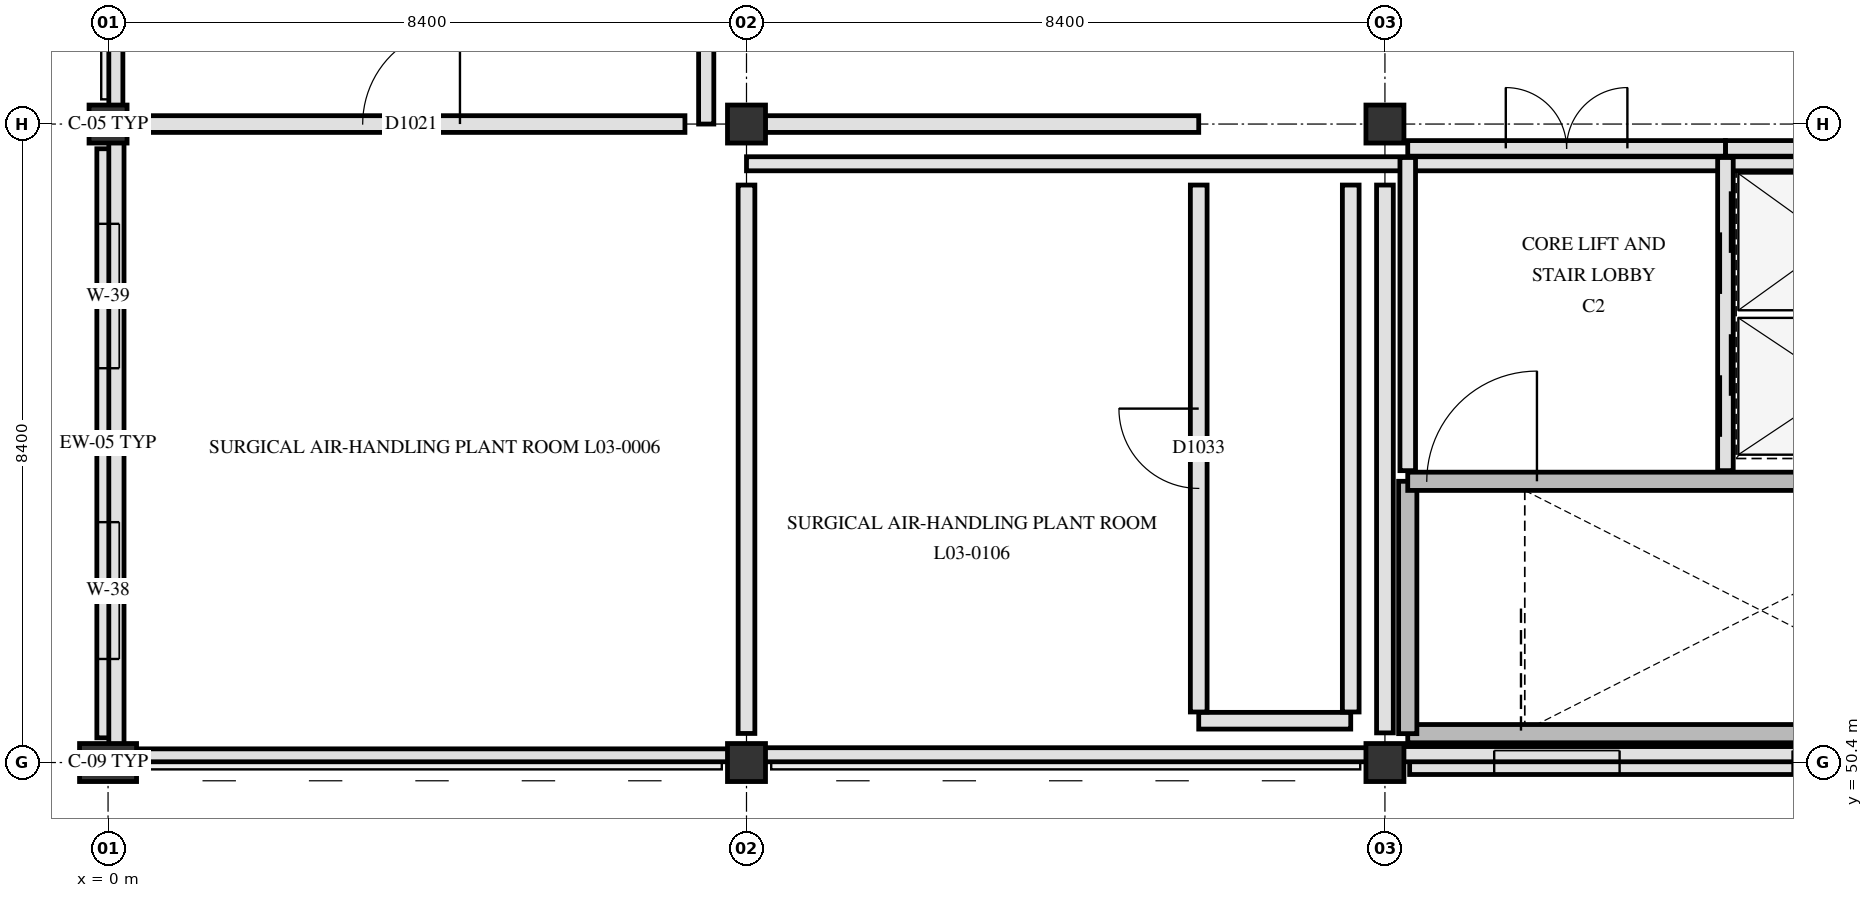
"""IFC4 building model, lengths in metres.
Left out: names, types, materials, properties, quantities, classifications, styles, units other than length and angle.
Written with IfcOpenShell. Run it as: python <this file> out.ifc"""

import sys

from ifc_helpers import new_model, si_unit, direction, frame, frame_2d, origin, origin_2d, place, context, subcontext, project, spatial, rectangle, extrude, element, fill, save


model = new_model("IFC4")
c1 = context("Model", 3, precision=1e-05, world=origin(), true_north=direction((0.0, 1.0)))
c2 = subcontext(c1, "Body", "Model", "MODEL_VIEW")
j1 = project(units=[si_unit("LENGTHUNIT", "METRE"), si_unit("PLANEANGLEUNIT", "RADIAN")], contexts=[c1])
p1 = place(None, origin())
s1 = spatial("IfcSite", under=j1, at=p1, CompositionType="ELEMENT")
p2 = place(p1, origin())
s2 = spatial("IfcBuilding", under=s1, at=p2, CompositionType="ELEMENT")
p3 = place(p2, frame((0.0, 0.0, 14.4)))
s3 = spatial("IfcBuildingStorey", under=s2, at=p3, CompositionType="ELEMENT", Elevation=14.4)
p4 = place(p3, frame((0.0, 50.4, 0.0), z_axis=(0.0, 0.0, 1.0), x_axis=(0.0, 1.0, 0.0)))
e1 = element("IfcColumn", 1, at=p4, inside=s3, PredefinedType="PILASTER", context=c2, shape_type="SweptSolid", body=[
    extrude(rectangle(XDim=0.5, YDim=0.75, at=origin_2d()), origin(), (0.0, 0.0, 1.0), 4.2),
])
for number, where, z_axis, x_axis in (
    (2, (0.0, 58.8, 0.0), (0.0, 0.0, 1.0), (1.0, 0.0, 0.0)),
    (3, (8.4, 50.4, 0.0), (0.0, 0.0, 1.0), (1.0, 0.0, 0.0)),
    (4, (8.4, 58.8, 0.0), (0.0, 0.0, 1.0), (1.0, 0.0, 0.0)),
    (5, (16.8, 50.4, 0.0), (0.0, 0.0, 1.0), (1.0, 0.0, 0.0)),
    (6, (16.8, 58.8, 0.0), (0.0, 0.0, 1.0), (1.0, 0.0, 0.0)),
):
    element("IfcColumn", number, at=place(p3, frame(where, z_axis=z_axis, x_axis=x_axis)), inside=s3, PredefinedType="COLUMN", context=c2, shape_type="SweptSolid", body=[
        extrude(rectangle(XDim=0.5, YDim=0.5, at=origin_2d()), origin(), (0.0, 0.0, 1.0), 4.2),
    ])
p5 = place(p3, frame((0.0, 50.725, 0.0), z_axis=(0.0, 0.0, 1.0), x_axis=(0.0, 1.0, 0.0)))
e7 = element("IfcWall", 7, at=p5, inside=s3, PredefinedType="SOLIDWALL", context=c2, shape_type="SweptSolid", body=[
    extrude(rectangle(XDim=7.75, YDim=0.295, at=frame_2d((3.875, 0.0))), origin(), (0.0, 0.0, 1.0), 3.19),
])
p6 = place(p5, frame((1.038, 0.0, 0.85)))
e8 = element("IfcOpeningElement", 8, at=p6, cuts=e7, PredefinedType="OPENING", context=c2, shape_type="SweptSolid", body=[
    extrude(rectangle(XDim=1.8, YDim=1.66, at=frame_2d((0.9, 0.83))), frame((0.0, 0.157, 0.0), z_axis=(0.0, -1.0, 0.0), x_axis=(1.0, 0.0, 0.0)), (0.0, 0.0, 1.0), 0.315),
])
p7 = place(p5, frame((4.863, 0.0, 0.85)))
e9 = element("IfcOpeningElement", 9, at=p7, cuts=e7, PredefinedType="OPENING", context=c2, shape_type="SweptSolid", body=[
    extrude(rectangle(XDim=1.9, YDim=1.66, at=frame_2d((0.95, 0.83))), frame((0.0, 0.157, 0.0), z_axis=(0.0, -1.0, 0.0), x_axis=(1.0, 0.0, 0.0)), (0.0, 0.0, 1.0), 0.315),
])
p8 = place(p3, frame((24.875, 50.4, 0.0), z_axis=(0.0, 0.0, 1.0), x_axis=(-1.0, 0.0, 0.0)))
e10 = element("IfcWall", 10, at=p8, inside=s3, PredefinedType="SOLIDWALL", context=c2, shape_type="SweptSolid", body=[
    extrude(rectangle(XDim=7.75, YDim=0.315, at=frame_2d((3.875, 0.0))), origin(), (0.0, 0.0, 1.0), 3.19),
])
p9 = place(p8, frame((1.163, 0.0, 0.85)))
e11 = element("IfcOpeningElement", 11, at=p9, cuts=e10, PredefinedType="OPENING", context=c2, shape_type="SweptSolid", body=[
    extrude(rectangle(XDim=1.55, YDim=1.54, at=frame_2d((0.775, 0.77))), frame((0.0, 0.167, 0.0), z_axis=(0.0, -1.0, 0.0), x_axis=(1.0, 0.0, 0.0)), (0.0, 0.0, 1.0), 0.335),
])
p10 = place(p8, frame((4.988, 0.0, 0.85)))
e12 = element("IfcOpeningElement", 12, at=p10, cuts=e10, PredefinedType="OPENING", context=c2, shape_type="SweptSolid", body=[
    extrude(rectangle(XDim=1.65, YDim=1.54, at=frame_2d((0.825, 0.77))), frame((0.0, 0.167, 0.0), z_axis=(0.0, -1.0, 0.0), x_axis=(1.0, 0.0, 0.0)), (0.0, 0.0, 1.0), 0.335),
])
p11 = place(p3, frame((7.87, 109.2, 4.18), z_axis=(0.0, 0.0, 1.0), x_axis=(0.0, -1.0, 0.0)))
e13 = element("IfcWall", 13, at=p11, inside=s3, PredefinedType="PARAPET", context=c2, shape_type="SweptSolid", body=[
    extrude(rectangle(XDim=50.4, YDim=0.2, at=frame_2d((25.2, 0.0))), origin(), (0.0, 0.0, 1.0), 1.17),
])
p12 = place(p3, frame((8.4, 58.278, 4.18), z_axis=(0.0, 0.0, 1.0), x_axis=(1.0, 0.0, 0.0)))
e14 = element("IfcWall", 14, at=p12, inside=s3, PredefinedType="PARAPET", context=c2, shape_type="SweptSolid", body=[
    extrude(rectangle(XDim=42.0, YDim=0.185, at=frame_2d((21.0, 0.0))), origin(), (0.0, 0.0, 1.0), 1.17),
])
p13 = place(p3, frame((25.2, 50.51, 4.18), z_axis=(0.0, 0.0, 1.0), x_axis=(-1.0, 0.0, 0.0)))
e15 = element("IfcWall", 15, at=p13, inside=s3, PredefinedType="PARAPET", context=c2, shape_type="SweptSolid", body=[
    extrude(rectangle(XDim=8.4, YDim=0.2, at=frame_2d((4.2, 0.0))), origin(), (0.0, 0.0, 1.0), 1.17),
])
p14 = place(p3, frame((16.8, 50.502, 4.18), z_axis=(0.0, 0.0, 1.0), x_axis=(-1.0, 0.0, 0.0)))
e16 = element("IfcWall", 16, at=p14, inside=s3, PredefinedType="PARAPET", context=c2, shape_type="SweptSolid", body=[
    extrude(rectangle(XDim=8.4, YDim=0.185, at=frame_2d((4.2, 0.0))), origin(), (0.0, 0.0, 1.0), 1.17),
])
p15 = place(p3, frame((8.4, 50.495, 4.18), z_axis=(0.0, 0.0, 1.0), x_axis=(-1.0, 0.0, 0.0)))
e17 = element("IfcWall", 17, at=p15, inside=s3, PredefinedType="PARAPET", context=c2, shape_type="SweptSolid", body=[
    extrude(rectangle(XDim=8.4, YDim=0.17, at=frame_2d((4.2, 0.0))), origin(), (0.0, 0.0, 1.0), 1.17),
])
p16 = place(p3, frame((0.11, 50.4, 4.18), z_axis=(0.0, 0.0, 1.0), x_axis=(0.0, 1.0, 0.0)))
e18 = element("IfcWall", 18, at=p16, inside=s3, PredefinedType="PARAPET", context=c2, shape_type="SweptSolid", body=[
    extrude(rectangle(XDim=8.4, YDim=0.2, at=frame_2d((4.2, 0.0))), origin(), (0.0, 0.0, 1.0), 1.17),
])
p17 = place(p3, frame((0.103, 58.8, 4.18), z_axis=(0.0, 0.0, 1.0), x_axis=(0.0, 1.0, 0.0)))
e19 = element("IfcWall", 19, at=p17, inside=s3, PredefinedType="PARAPET", context=c2, shape_type="SweptSolid", body=[
    extrude(rectangle(XDim=8.4, YDim=0.185, at=frame_2d((4.2, 0.0))), origin(), (0.0, 0.0, 1.0), 1.17),
])
p18 = place(p3, frame((17.1, 50.78, 0.0), z_axis=(0.0, 0.0, 1.0), x_axis=(1.0, 0.0, 0.0)))
e20 = element("IfcWall", 20, at=p18, inside=s3, PredefinedType="SHEAR", context=c2, shape_type="SweptSolid", body=[
    extrude(rectangle(XDim=7.82, YDim=0.24, at=frame_2d((3.91, 0.0))), origin(), (0.0, 0.0, 1.0), 3.9),
])
p19 = place(p3, frame((17.1, 50.78, 0.0), z_axis=(0.0, 0.0, 1.0), x_axis=(0.0, 1.0, 0.0)))
e21 = element("IfcWall", 21, at=p19, inside=s3, PredefinedType="SHEAR", context=c2, shape_type="SweptSolid", body=[
    extrude(rectangle(XDim=3.32, YDim=0.24, at=frame_2d((1.66, 0.0))), origin(), (0.0, 0.0, 1.0), 3.9),
])
p20 = place(p3, frame((17.1, 54.1, 0.0), z_axis=(0.0, 0.0, 1.0), x_axis=(1.0, 0.0, 0.0)))
e22 = element("IfcWall", 22, at=p20, inside=s3, PredefinedType="SHEAR", context=c2, shape_type="SweptSolid", body=[
    extrude(rectangle(XDim=7.82, YDim=0.24, at=frame_2d((3.91, 0.0))), origin(), (0.0, 0.0, 1.0), 3.9),
])
p21 = place(p20, frame((0.25, 0.0, 0.0)))
e23 = element("IfcOpeningElement", 23, at=p21, cuts=e22, PredefinedType="OPENING", context=c2, shape_type="SweptSolid", body=[
    extrude(rectangle(XDim=1.45, YDim=2.2, at=frame_2d((0.725, 1.1))), frame((0.0, 0.13, 0.0), z_axis=(0.0, -1.0, 0.0), x_axis=(1.0, 0.0, 0.0)), (0.0, 0.0, 1.0), 0.26),
])
p22 = place(p3, frame((21.28, 54.24, 0.0), z_axis=(0.0, 0.0, 1.0), x_axis=(0.0, 1.0, 0.0)))
e24 = element("IfcWall", 24, at=p22, inside=s3, PredefinedType="PARTITIONING", context=c2, shape_type="SweptSolid", body=[
    extrude(rectangle(XDim=4.12, YDim=0.205, at=frame_2d((2.06, 0.0))), origin(), (0.0, 0.0, 1.0), 3.89),
])
p23 = place(p22, frame((0.445, 0.0, 0.0)))
e25 = element("IfcOpeningElement", 25, at=p23, cuts=e24, PredefinedType="OPENING", context=c2, shape_type="SweptSolid", body=[
    extrude(rectangle(XDim=1.35, YDim=2.2, at=frame_2d((0.675, 1.1))), frame((0.0, 0.113, 0.0), z_axis=(0.0, -1.0, 0.0), x_axis=(1.0, 0.0, 0.0)), (0.0, 0.0, 1.0), 0.225),
])
p24 = place(p22, frame((2.325, 0.0, 0.0)))
e26 = element("IfcOpeningElement", 26, at=p24, cuts=e24, PredefinedType="OPENING", context=c2, shape_type="SweptSolid", body=[
    extrude(rectangle(XDim=1.35, YDim=2.2, at=frame_2d((0.675, 1.1))), frame((0.0, 0.113, 0.0), z_axis=(0.0, -1.0, 0.0), x_axis=(1.0, 0.0, 0.0)), (0.0, 0.0, 1.0), 0.225),
])
p25 = place(p3, frame((21.28, 58.48, 0.0), z_axis=(0.0, 0.0, 1.0), x_axis=(1.0, 0.0, 0.0)))
e27 = element("IfcWall", 27, at=p25, inside=s3, PredefinedType="PARTITIONING", context=c2, shape_type="SweptSolid", body=[
    extrude(rectangle(XDim=3.57, YDim=0.205, at=frame_2d((1.785, 0.0))), origin(), (0.0, 0.0, 1.0), 3.28),
])
p26 = place(p3, frame((17.1, 54.24, 0.0), z_axis=(0.0, 0.0, 1.0), x_axis=(0.0, 1.0, 0.0)))
e28 = element("IfcWall", 28, at=p26, inside=s3, PredefinedType="PARTITIONING", context=c2, shape_type="SweptSolid", body=[
    extrude(rectangle(XDim=4.12, YDim=0.205, at=frame_2d((2.06, 0.0))), origin(), (0.0, 0.0, 1.0), 3.34),
])
p27 = place(p3, frame((17.1, 58.48, 0.0), z_axis=(0.0, 0.0, 1.0), x_axis=(1.0, 0.0, 0.0)))
e29 = element("IfcWall", 29, at=p27, inside=s3, PredefinedType="PARTITIONING", context=c2, shape_type="SweptSolid", body=[
    extrude(rectangle(XDim=4.18, YDim=0.205, at=frame_2d((2.09, 0.0))), origin(), (0.0, 0.0, 1.0), 3.28),
])
p28 = place(p27, frame((1.29, 0.0, 0.0)))
e30 = element("IfcOpeningElement", 30, at=p28, cuts=e29, PredefinedType="OPENING", context=c2, shape_type="SweptSolid", body=[
    extrude(rectangle(XDim=1.6, YDim=2.25, at=frame_2d((0.8, 1.125))), frame((0.0, 0.113, 0.0), z_axis=(0.0, -1.0, 0.0), x_axis=(1.0, 0.0, 0.0)), (0.0, 0.0, 1.0), 0.225),
])
p29 = place(p3, frame((14.35, 50.95, 0.0), z_axis=(0.0, 0.0, 1.0), x_axis=(1.0, 0.0, 0.0)))
e31 = element("IfcWall", 31, at=p29, inside=s3, PredefinedType="PARTITIONING", context=c2, shape_type="SweptSolid", body=[
    extrude(rectangle(XDim=2.0, YDim=0.22, at=frame_2d((1.0, 0.0))), origin(), (0.0, 0.0, 1.0), 3.89),
])
p30 = place(p3, frame((0.39, 58.8, 0.0), z_axis=(0.0, 0.0, 1.0), x_axis=(1.0, 0.0, 0.0)))
e32 = element("IfcWall", 32, at=p30, inside=s3, PredefinedType="PARTITIONING", context=c2, shape_type="SweptSolid", body=[
    extrude(rectangle(XDim=7.2, YDim=0.22, at=frame_2d((3.6, 0.0))), origin(), (0.0, 0.0, 1.0), 3.29),
])
p31 = place(p30, frame((2.96, 0.0, 0.0)))
e33 = element("IfcOpeningElement", 33, at=p31, cuts=e32, PredefinedType="OPENING", context=c2, shape_type="SweptSolid", body=[
    extrude(rectangle(XDim=1.28, YDim=2.18, at=frame_2d((0.64, 1.09))), frame((0.0, 0.12, 0.0), z_axis=(0.0, -1.0, 0.0), x_axis=(1.0, 0.0, 0.0)), (0.0, 0.0, 1.0), 0.24),
])
p32 = place(p3, frame((8.645, 58.8, 0.0), z_axis=(0.0, 0.0, 1.0), x_axis=(1.0, 0.0, 0.0)))
e34 = element("IfcWall", 34, at=p32, inside=s3, PredefinedType="PARTITIONING", context=c2, shape_type="SweptSolid", body=[
    extrude(rectangle(XDim=5.705, YDim=0.22, at=frame_2d((2.853, 0.0))), origin(), (0.0, 0.0, 1.0), 3.28),
])
p33 = place(p3, frame((8.4, 50.782, 0.0), z_axis=(0.0, 0.0, 1.0), x_axis=(0.0, 1.0, 0.0)))
e35 = element("IfcWall", 35, at=p33, inside=s3, PredefinedType="PARTITIONING", context=c2, shape_type="SweptSolid", body=[
    extrude(rectangle(XDim=7.215, YDim=0.22, at=frame_2d((3.607, 0.0))), origin(), (0.0, 0.0, 1.0), 3.34),
])
p34 = place(p3, frame((14.35, 51.065, 0.0), z_axis=(0.0, 0.0, 1.0), x_axis=(0.0, 1.0, 0.0)))
e36 = element("IfcWall", 36, at=p34, inside=s3, PredefinedType="PARTITIONING", context=c2, shape_type="SweptSolid", body=[
    extrude(rectangle(XDim=6.933, YDim=0.22, at=frame_2d((3.466, 0.0))), origin(), (0.0, 0.0, 1.0), 3.89),
])
p35 = place(p34, frame((2.941, 0.0, 0.0)))
e37 = element("IfcOpeningElement", 37, at=p35, cuts=e36, PredefinedType="OPENING", context=c2, shape_type="SweptSolid", body=[
    extrude(rectangle(XDim=1.05, YDim=2.15, at=frame_2d((0.525, 1.075))), frame((0.0, 0.12, 0.0), z_axis=(0.0, -1.0, 0.0), x_axis=(1.0, 0.0, 0.0)), (0.0, 0.0, 1.0), 0.24),
])
p36 = place(p3, frame((16.35, 51.065, 0.0), z_axis=(0.0, 0.0, 1.0), x_axis=(0.0, 1.0, 0.0)))
e38 = element("IfcWall", 38, at=p36, inside=s3, PredefinedType="PARTITIONING", context=c2, shape_type="SweptSolid", body=[
    extrude(rectangle(XDim=6.933, YDim=0.22, at=frame_2d((3.466, 0.0))), origin(), (0.0, 0.0, 1.0), 3.89),
])
p37 = place(p3, frame((16.8, 50.79, 0.0), z_axis=(0.0, 0.0, 1.0), x_axis=(0.0, 1.0, 0.0)))
e39 = element("IfcWall", 39, at=p37, inside=s3, PredefinedType="PARTITIONING", context=c2, shape_type="SweptSolid", body=[
    extrude(rectangle(XDim=7.208, YDim=0.22, at=frame_2d((3.604, 0.0))), origin(), (0.0, 0.0, 1.0), 3.34),
])
p38 = place(p6, origin())
e40 = element("IfcWindow", 40, at=p38, inside=s3, PartitioningType="SINGLE_PANEL", PredefinedType="WINDOW", context=c2, shape_type="SweptSolid", body=[
    extrude(rectangle(XDim=1.8, YDim=1.66, at=frame_2d((0.9, 0.83))), frame((0.0, 0.03, 0.0), z_axis=(0.0, -1.0, 0.0), x_axis=(1.0, 0.0, 0.0)), (0.0, 0.0, 1.0), 0.06),
])
fill(e8, e40)
p39 = place(p7, origin())
e41 = element("IfcWindow", 41, at=p39, inside=s3, PartitioningType="SINGLE_PANEL", PredefinedType="WINDOW", context=c2, shape_type="SweptSolid", body=[
    extrude(rectangle(XDim=1.9, YDim=1.66, at=frame_2d((0.95, 0.83))), frame((0.0, 0.03, 0.0), z_axis=(0.0, -1.0, 0.0), x_axis=(1.0, 0.0, 0.0)), (0.0, 0.0, 1.0), 0.06),
])
fill(e9, e41)
p40 = place(p9, origin())
e42 = element("IfcWindow", 42, at=p40, inside=s3, PartitioningType="SINGLE_PANEL", PredefinedType="WINDOW", context=c2, shape_type="SweptSolid", body=[
    extrude(rectangle(XDim=1.55, YDim=1.54, at=frame_2d((0.775, 0.77))), frame((0.0, 0.03, 0.0), z_axis=(0.0, -1.0, 0.0), x_axis=(1.0, 0.0, 0.0)), (0.0, 0.0, 1.0), 0.06),
])
fill(e11, e42)
p41 = place(p10, origin())
e43 = element("IfcWindow", 43, at=p41, inside=s3, PartitioningType="SINGLE_PANEL", PredefinedType="WINDOW", context=c2, shape_type="SweptSolid", body=[
    extrude(rectangle(XDim=1.65, YDim=1.54, at=frame_2d((0.825, 0.77))), frame((0.0, 0.03, 0.0), z_axis=(0.0, -1.0, 0.0), x_axis=(1.0, 0.0, 0.0)), (0.0, 0.0, 1.0), 0.06),
])
fill(e12, e43)
p42 = place(p21, origin())
e44 = element("IfcDoor", 44, at=p42, inside=s3, OperationType="SINGLE_SWING_RIGHT", PredefinedType="DOOR", context=c2, shape_type="SweptSolid", body=[
    extrude(rectangle(XDim=1.45, YDim=2.2, at=frame_2d((0.725, 1.1))), frame((0.0, 0.025, 0.0), z_axis=(0.0, -1.0, 0.0), x_axis=(1.0, 0.0, 0.0)), (0.0, 0.0, 1.0), 0.05),
])
fill(e23, e44)
p43 = place(p23, origin())
e45 = element("IfcDoor", 45, at=p43, inside=s3, OperationType="SLIDING_TO_LEFT", PredefinedType="DOOR", context=c2, shape_type="SweptSolid", body=[
    extrude(rectangle(XDim=1.35, YDim=2.2, at=frame_2d((0.675, 1.1))), frame((0.0, 0.025, 0.0), z_axis=(0.0, -1.0, 0.0), x_axis=(1.0, 0.0, 0.0)), (0.0, 0.0, 1.0), 0.05),
])
fill(e25, e45)
p44 = place(p24, origin())
e46 = element("IfcDoor", 46, at=p44, inside=s3, OperationType="SLIDING_TO_LEFT", PredefinedType="DOOR", context=c2, shape_type="SweptSolid", body=[
    extrude(rectangle(XDim=1.35, YDim=2.2, at=frame_2d((0.675, 1.1))), frame((0.0, 0.025, 0.0), z_axis=(0.0, -1.0, 0.0), x_axis=(1.0, 0.0, 0.0)), (0.0, 0.0, 1.0), 0.05),
])
fill(e26, e46)
p45 = place(p28, origin())
e47 = element("IfcDoor", 47, at=p45, inside=s3, OperationType="DOUBLE_SWING_LEFT", PredefinedType="DOOR", context=c2, shape_type="SweptSolid", body=[
    extrude(rectangle(XDim=1.6, YDim=2.25, at=frame_2d((0.8, 1.125))), frame((0.0, 0.025, 0.0), z_axis=(0.0, -1.0, 0.0), x_axis=(1.0, 0.0, 0.0)), (0.0, 0.0, 1.0), 0.05),
])
fill(e30, e47)
p46 = place(p31, origin())
e48 = element("IfcDoor", 48, at=p46, inside=s3, OperationType="SINGLE_SWING_RIGHT", PredefinedType="DOOR", context=c2, shape_type="SweptSolid", body=[
    extrude(rectangle(XDim=1.28, YDim=2.18, at=frame_2d((0.64, 1.09))), frame((0.0, 0.025, 0.0), z_axis=(0.0, -1.0, 0.0), x_axis=(1.0, 0.0, 0.0)), (0.0, 0.0, 1.0), 0.05),
])
fill(e33, e48)
p47 = place(p35, origin())
e49 = element("IfcDoor", 49, at=p47, inside=s3, OperationType="SINGLE_SWING_RIGHT", PredefinedType="DOOR", context=c2, shape_type="SweptSolid", body=[
    extrude(rectangle(XDim=1.05, YDim=2.15, at=frame_2d((0.525, 1.075))), frame((0.0, 0.025, 0.0), z_axis=(0.0, -1.0, 0.0), x_axis=(1.0, 0.0, 0.0)), (0.0, 0.0, 1.0), 0.05),
])
fill(e37, e49)
save(model, sys.argv[1])
